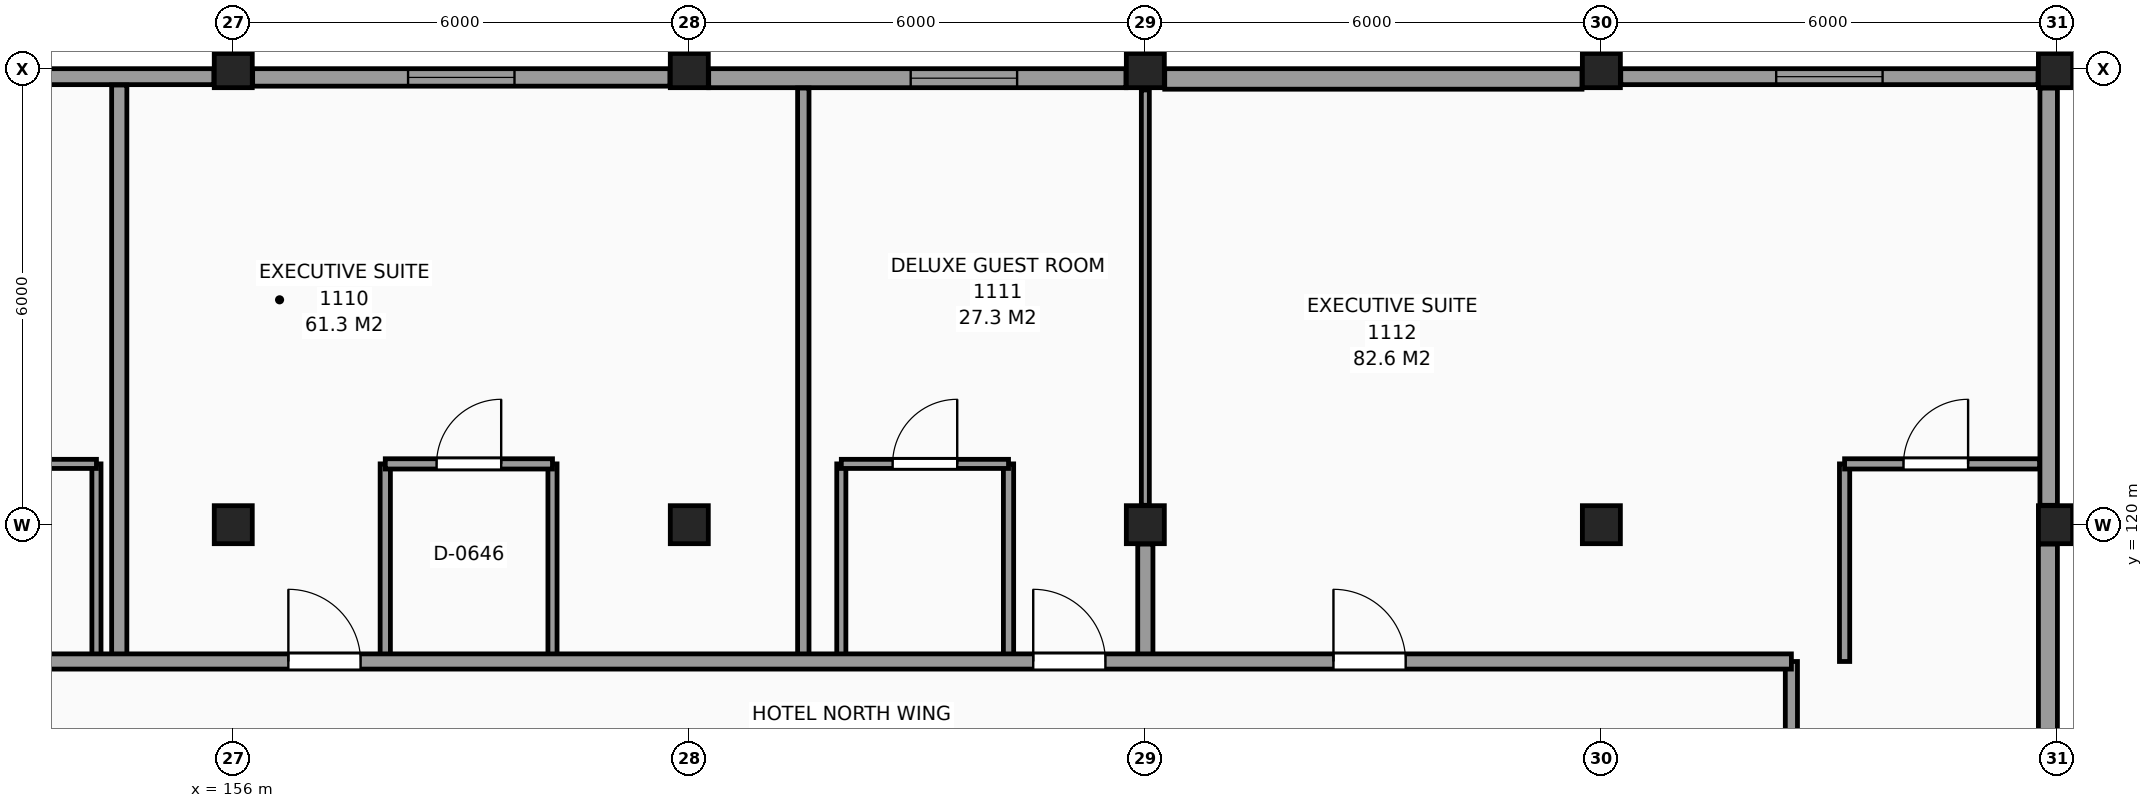
"""IFC4 building model, lengths in metres.
Left out: names, types, materials, properties, quantities, classifications, styles, units other than length and angle.
Written with IfcOpenShell. Run it as: python <this file> out.ifc"""

import sys

from ifc_helpers import new_model, si_unit, direction, frame, frame_2d, origin, origin_2d, place, context, subcontext, project, spatial, rectangle, extrude, element, fill, save


model = new_model("IFC4")
c1 = context("Model", 3, precision=1e-05, world=origin(), true_north=direction((0.0, 1.0)))
c2 = subcontext(c1, "Body", "Model", "MODEL_VIEW")
j1 = project(units=[si_unit("LENGTHUNIT", "METRE"), si_unit("PLANEANGLEUNIT", "RADIAN")], contexts=[c1])
p1 = place(None, origin())
s1 = spatial("IfcSite", under=j1, at=p1, CompositionType="ELEMENT")
p2 = place(p1, origin())
s2 = spatial("IfcBuilding", under=s1, at=p2, CompositionType="ELEMENT")
p3 = place(p2, frame((0.0, 0.0, 44.7)))
s3 = spatial("IfcBuildingStorey", under=s2, at=p3, CompositionType="ELEMENT", Elevation=44.7)
for number, where, z_axis, x_axis in (
    (1, (156.0, 120.0, 0.0), (0.0, 0.0, 1.0), (1.0, 0.0, 0.0)),
    (2, (156.0, 126.0, 0.0), (0.0, 0.0, 1.0), (1.0, 0.0, 0.0)),
    (3, (162.0, 120.0, 0.0), (0.0, 0.0, 1.0), (1.0, 0.0, 0.0)),
    (4, (162.0, 126.0, 0.0), (0.0, 0.0, 1.0), (1.0, 0.0, 0.0)),
    (5, (168.0, 120.0, 0.0), (0.0, 0.0, 1.0), (1.0, 0.0, 0.0)),
    (6, (168.0, 126.0, 0.0), (0.0, 0.0, 1.0), (1.0, 0.0, 0.0)),
    (7, (174.0, 120.0, 0.0), (0.0, 0.0, 1.0), (1.0, 0.0, 0.0)),
    (8, (174.0, 126.0, 0.0), (0.0, 0.0, 1.0), (1.0, 0.0, 0.0)),
    (9, (180.0, 120.0, 0.0), (0.0, 0.0, 1.0), (1.0, 0.0, 0.0)),
    (10, (180.0, 126.0, 0.0), (0.0, 0.0, 1.0), (1.0, 0.0, 0.0)),
):
    element("IfcColumn", number, at=place(p3, frame(where, z_axis=z_axis, x_axis=x_axis)), inside=s3, PredefinedType="COLUMN", context=c2, shape_type="SweptSolid", body=[
        extrude(rectangle(XDim=0.5, YDim=0.5, at=origin_2d()), origin(), (0.0, 0.0, 1.0), 3.3),
    ])
p4 = place(p3, frame((179.875, 114.255, 0.0), z_axis=(0.0, 0.0, 1.0), x_axis=(0.0, 1.0, 0.0)))
e11 = element("IfcWall", 11, at=p4, inside=s3, PredefinedType="SOLIDWALL", context=c2, shape_type="SweptSolid", body=[
    extrude(rectangle(XDim=5.49, YDim=0.25, at=frame_2d((2.745, 0.0))), origin(), (0.0, 0.0, 1.0), 2.4),
])
p5 = place(p3, frame((179.885, 120.255, 0.0), z_axis=(0.0, 0.0, 1.0), x_axis=(0.0, 1.0, 0.0)))
e12 = element("IfcWall", 12, at=p5, inside=s3, PredefinedType="SOLIDWALL", context=c2, shape_type="SweptSolid", body=[
    extrude(rectangle(XDim=5.49, YDim=0.23, at=frame_2d((2.745, 0.0))), origin(), (0.0, 0.0, 1.0), 2.4),
])
p6 = place(p3, frame((179.745, 125.895, 0.0), z_axis=(0.0, 0.0, 1.0), x_axis=(-1.0, 0.0, 0.0)))
e13 = element("IfcWall", 13, at=p6, inside=s3, PredefinedType="SOLIDWALL", context=c2, shape_type="SweptSolid", body=[
    extrude(rectangle(XDim=5.49, YDim=0.21, at=frame_2d((2.745, 0.0))), origin(), (0.0, 0.0, 1.0), 2.4),
])
p7 = place(p6, frame((2.045, 0.0, 0.8)))
e14 = element("IfcOpeningElement", 14, at=p7, cuts=e13, PredefinedType="OPENING", context=c2, shape_type="SweptSolid", body=[
    extrude(rectangle(XDim=1.4, YDim=1.4, at=frame_2d((0.7, 0.7))), frame((0.0, 0.115, 0.0), z_axis=(0.0, -1.0, 0.0), x_axis=(1.0, 0.0, 0.0)), (0.0, 0.0, 1.0), 0.23),
])
p8 = place(p3, frame((173.745, 125.865, 0.0), z_axis=(0.0, 0.0, 1.0), x_axis=(-1.0, 0.0, 0.0)))
e15 = element("IfcWall", 15, at=p8, inside=s3, PredefinedType="SOLIDWALL", context=c2, shape_type="SweptSolid", body=[
    extrude(rectangle(XDim=5.49, YDim=0.27, at=frame_2d((2.745, 0.0))), origin(), (0.0, 0.0, 1.0), 2.4),
])
p9 = place(p3, frame((167.745, 125.875, 0.0), z_axis=(0.0, 0.0, 1.0), x_axis=(-1.0, 0.0, 0.0)))
e16 = element("IfcWall", 16, at=p9, inside=s3, PredefinedType="SOLIDWALL", context=c2, shape_type="SweptSolid", body=[
    extrude(rectangle(XDim=5.49, YDim=0.25, at=frame_2d((2.745, 0.0))), origin(), (0.0, 0.0, 1.0), 2.4),
])
p10 = place(p9, frame((1.432, 0.0, 0.8)))
e17 = element("IfcOpeningElement", 17, at=p10, cuts=e16, PredefinedType="OPENING", context=c2, shape_type="SweptSolid", body=[
    extrude(rectangle(XDim=1.4, YDim=1.4, at=frame_2d((0.7, 0.7))), frame((0.0, 0.135, 0.0), z_axis=(0.0, -1.0, 0.0), x_axis=(1.0, 0.0, 0.0)), (0.0, 0.0, 1.0), 0.27),
])
p11 = place(p3, frame((161.745, 125.885, 0.0), z_axis=(0.0, 0.0, 1.0), x_axis=(-1.0, 0.0, 0.0)))
e18 = element("IfcWall", 18, at=p11, inside=s3, PredefinedType="SOLIDWALL", context=c2, shape_type="SweptSolid", body=[
    extrude(rectangle(XDim=5.49, YDim=0.23, at=frame_2d((2.745, 0.0))), origin(), (0.0, 0.0, 1.0), 2.4),
])
p12 = place(p11, frame((2.045, 0.0, 0.8)))
e19 = element("IfcOpeningElement", 19, at=p12, cuts=e18, PredefinedType="OPENING", context=c2, shape_type="SweptSolid", body=[
    extrude(rectangle(XDim=1.4, YDim=1.4, at=frame_2d((0.7, 0.7))), frame((0.0, 0.125, 0.0), z_axis=(0.0, -1.0, 0.0), x_axis=(1.0, 0.0, 0.0)), (0.0, 0.0, 1.0), 0.25),
])
p13 = place(p3, frame((155.745, 125.895, 0.0), z_axis=(0.0, 0.0, 1.0), x_axis=(-1.0, 0.0, 0.0)))
e20 = element("IfcWall", 20, at=p13, inside=s3, PredefinedType="SOLIDWALL", context=c2, shape_type="SweptSolid", body=[
    extrude(rectangle(XDim=5.49, YDim=0.21, at=frame_2d((2.745, 0.0))), origin(), (0.0, 0.0, 1.0), 2.4),
])
p14 = place(p13, frame((2.658, 0.0, 0.8)))
e21 = element("IfcOpeningElement", 21, at=p14, cuts=e20, PredefinedType="OPENING", context=c2, shape_type="SweptSolid", body=[
    extrude(rectangle(XDim=1.4, YDim=1.4, at=frame_2d((0.7, 0.7))), frame((0.0, 0.115, 0.0), z_axis=(0.0, -1.0, 0.0), x_axis=(1.0, 0.0, 0.0)), (0.0, 0.0, 1.0), 0.23),
])
p15 = place(p3, frame((154.2, 118.2, 0.0), z_axis=(0.0, 0.0, 1.0), x_axis=(0.0, 1.0, 0.0)))
e22 = element("IfcWall", 22, at=p15, inside=s3, PredefinedType="PARTITIONING", context=c2, shape_type="SweptSolid", body=[
    extrude(rectangle(XDim=2.6, YDim=0.12, at=frame_2d((1.3, 0.0))), origin(), (0.0, 0.0, 1.0), 3.05),
])
p16 = place(p3, frame((154.5, 118.2, 0.0), z_axis=(0.0, 0.0, 1.0), x_axis=(0.0, 1.0, 0.0)))
e23 = element("IfcWall", 23, at=p16, inside=s3, PredefinedType="PARTITIONING", context=c2, shape_type="SweptSolid", body=[
    extrude(rectangle(XDim=7.585, YDim=0.2, at=frame_2d((3.792, 0.0))), origin(), (0.0, 0.0, 1.0), 3.05),
])
p17 = place(p3, frame((158.0, 118.2, 0.0), z_axis=(0.0, 0.0, 1.0), x_axis=(0.0, 1.0, 0.0)))
e24 = element("IfcWall", 24, at=p17, inside=s3, PredefinedType="PARTITIONING", context=c2, shape_type="SweptSolid", body=[
    extrude(rectangle(XDim=2.6, YDim=0.135, at=frame_2d((1.3, 0.0))), origin(), (0.0, 0.0, 1.0), 3.05),
])
p18 = place(p3, frame((160.2, 118.2, 0.0), z_axis=(0.0, 0.0, 1.0), x_axis=(0.0, 1.0, 0.0)))
e25 = element("IfcWall", 25, at=p18, inside=s3, PredefinedType="PARTITIONING", context=c2, shape_type="SweptSolid", body=[
    extrude(rectangle(XDim=2.6, YDim=0.12, at=frame_2d((1.3, 0.0))), origin(), (0.0, 0.0, 1.0), 3.05),
])
p19 = place(p3, frame((163.5, 118.2, 0.0), z_axis=(0.0, 0.0, 1.0), x_axis=(0.0, 1.0, 0.0)))
e26 = element("IfcWall", 26, at=p19, inside=s3, PredefinedType="PARTITIONING", context=c2, shape_type="SweptSolid", body=[
    extrude(rectangle(XDim=7.545, YDim=0.15, at=frame_2d((3.772, 0.0))), origin(), (0.0, 0.0, 1.0), 3.05),
])
p20 = place(p3, frame((164.0, 118.2, 0.0), z_axis=(0.0, 0.0, 1.0), x_axis=(0.0, 1.0, 0.0)))
e27 = element("IfcWall", 27, at=p20, inside=s3, PredefinedType="PARTITIONING", context=c2, shape_type="SweptSolid", body=[
    extrude(rectangle(XDim=2.6, YDim=0.12, at=frame_2d((1.3, 0.0))), origin(), (0.0, 0.0, 1.0), 3.05),
])
p21 = place(p3, frame((166.2, 118.2, 0.0), z_axis=(0.0, 0.0, 1.0), x_axis=(0.0, 1.0, 0.0)))
e28 = element("IfcWall", 28, at=p21, inside=s3, PredefinedType="PARTITIONING", context=c2, shape_type="SweptSolid", body=[
    extrude(rectangle(XDim=2.6, YDim=0.135, at=frame_2d((1.3, 0.0))), origin(), (0.0, 0.0, 1.0), 3.05),
])
p22 = place(p3, frame((168.0, 118.2, 0.0), z_axis=(0.0, 0.0, 1.0), x_axis=(0.0, 1.0, 0.0)))
e29 = element("IfcWall", 29, at=p22, inside=s3, PredefinedType="PARTITIONING", context=c2, shape_type="SweptSolid", body=[
    extrude(rectangle(XDim=1.545, YDim=0.2, at=frame_2d((0.772, 0.0))), origin(), (0.0, 0.0, 1.0), 2.35),
])
p23 = place(p3, frame((168.0, 120.255, 0.0), z_axis=(0.0, 0.0, 1.0), x_axis=(0.0, 1.0, 0.0)))
e30 = element("IfcWall", 30, at=p23, inside=s3, PredefinedType="PARTITIONING", context=c2, shape_type="SweptSolid", body=[
    extrude(rectangle(XDim=5.465, YDim=0.105, at=frame_2d((2.732, 0.0))), origin(), (0.0, 0.0, 1.0), 2.5),
])
p24 = place(p3, frame((176.5, 115.8, 0.0), z_axis=(0.0, 0.0, 1.0), x_axis=(0.0, 1.0, 0.0)))
e31 = element("IfcWall", 31, at=p24, inside=s3, PredefinedType="PARTITIONING", context=c2, shape_type="SweptSolid", body=[
    extrude(rectangle(XDim=2.4, YDim=0.16, at=frame_2d((1.2, 0.0))), origin(), (0.0, 0.0, 1.0), 3.05),
])
p25 = place(p3, frame((177.2, 118.2, 0.0), z_axis=(0.0, 0.0, 1.0), x_axis=(0.0, 1.0, 0.0)))
e32 = element("IfcWall", 32, at=p25, inside=s3, PredefinedType="PARTITIONING", context=c2, shape_type="SweptSolid", body=[
    extrude(rectangle(XDim=2.6, YDim=0.135, at=frame_2d((1.3, 0.0))), origin(), (0.0, 0.0, 1.0), 3.05),
])
p26 = place(p3, frame((102.255, 118.2, 0.0), z_axis=(0.0, 0.0, 1.0), x_axis=(1.0, 0.0, 0.0)))
e33 = element("IfcWall", 33, at=p26, inside=s3, PredefinedType="PARTITIONING", context=c2, shape_type="SweptSolid", body=[
    extrude(rectangle(XDim=74.245, YDim=0.2, at=frame_2d((37.123, 0.0))), origin(), (0.0, 0.0, 1.0), 3.05),
])
p27 = place(p26, frame((0.47, 0.0, 0.0)))
e34 = element("IfcOpeningElement", 34, at=p27, cuts=e33, PredefinedType="OPENING", context=c2, shape_type="SweptSolid", body=[
    extrude(rectangle(XDim=0.95, YDim=2.1, at=frame_2d((0.475, 1.05))), frame((0.0, 0.11, 0.0), z_axis=(0.0, -1.0, 0.0), x_axis=(1.0, 0.0, 0.0)), (0.0, 0.0, 1.0), 0.22),
])
p28 = place(p26, frame((4.87, 0.0, 0.0)))
e35 = element("IfcOpeningElement", 35, at=p28, cuts=e33, PredefinedType="OPENING", context=c2, shape_type="SweptSolid", body=[
    extrude(rectangle(XDim=0.95, YDim=2.1, at=frame_2d((0.475, 1.05))), frame((0.0, 0.11, 0.0), z_axis=(0.0, -1.0, 0.0), x_axis=(1.0, 0.0, 0.0)), (0.0, 0.0, 1.0), 0.22),
])
p29 = place(p26, frame((12.07, 0.0, 0.0)))
e36 = element("IfcOpeningElement", 36, at=p29, cuts=e33, PredefinedType="OPENING", context=c2, shape_type="SweptSolid", body=[
    extrude(rectangle(XDim=0.95, YDim=2.1, at=frame_2d((0.475, 1.05))), frame((0.0, 0.11, 0.0), z_axis=(0.0, -1.0, 0.0), x_axis=(1.0, 0.0, 0.0)), (0.0, 0.0, 1.0), 0.22),
])
p30 = place(p26, frame((16.27, 0.0, 0.0)))
e37 = element("IfcOpeningElement", 37, at=p30, cuts=e33, PredefinedType="OPENING", context=c2, shape_type="SweptSolid", body=[
    extrude(rectangle(XDim=0.95, YDim=2.1, at=frame_2d((0.475, 1.05))), frame((0.0, 0.11, 0.0), z_axis=(0.0, -1.0, 0.0), x_axis=(1.0, 0.0, 0.0)), (0.0, 0.0, 1.0), 0.22),
])
p31 = place(p26, frame((25.57, 0.0, 0.0)))
e38 = element("IfcOpeningElement", 38, at=p31, cuts=e33, PredefinedType="OPENING", context=c2, shape_type="SweptSolid", body=[
    extrude(rectangle(XDim=0.95, YDim=2.1, at=frame_2d((0.475, 1.05))), frame((0.0, 0.11, 0.0), z_axis=(0.0, -1.0, 0.0), x_axis=(1.0, 0.0, 0.0)), (0.0, 0.0, 1.0), 0.22),
])
p32 = place(p26, frame((30.07, 0.0, 0.0)))
e39 = element("IfcOpeningElement", 39, at=p32, cuts=e33, PredefinedType="OPENING", context=c2, shape_type="SweptSolid", body=[
    extrude(rectangle(XDim=0.95, YDim=2.1, at=frame_2d((0.475, 1.05))), frame((0.0, 0.11, 0.0), z_axis=(0.0, -1.0, 0.0), x_axis=(1.0, 0.0, 0.0)), (0.0, 0.0, 1.0), 0.22),
])
p33 = place(p26, frame((38.32, 0.0, 0.0)))
e40 = element("IfcOpeningElement", 40, at=p33, cuts=e33, PredefinedType="OPENING", context=c2, shape_type="SweptSolid", body=[
    extrude(rectangle(XDim=0.95, YDim=2.1, at=frame_2d((0.475, 1.05))), frame((0.0, 0.11, 0.0), z_axis=(0.0, -1.0, 0.0), x_axis=(1.0, 0.0, 0.0)), (0.0, 0.0, 1.0), 0.22),
])
p34 = place(p26, frame((46.27, 0.0, 0.0)))
e41 = element("IfcOpeningElement", 41, at=p34, cuts=e33, PredefinedType="OPENING", context=c2, shape_type="SweptSolid", body=[
    extrude(rectangle(XDim=0.95, YDim=2.1, at=frame_2d((0.475, 1.05))), frame((0.0, 0.11, 0.0), z_axis=(0.0, -1.0, 0.0), x_axis=(1.0, 0.0, 0.0)), (0.0, 0.0, 1.0), 0.22),
])
p35 = place(p26, frame((48.47, 0.0, 0.0)))
e42 = element("IfcOpeningElement", 42, at=p35, cuts=e33, PredefinedType="OPENING", context=c2, shape_type="SweptSolid", body=[
    extrude(rectangle(XDim=0.95, YDim=2.1, at=frame_2d((0.475, 1.05))), frame((0.0, 0.11, 0.0), z_axis=(0.0, -1.0, 0.0), x_axis=(1.0, 0.0, 0.0)), (0.0, 0.0, 1.0), 0.22),
])
p36 = place(p26, frame((54.47, 0.0, 0.0)))
e43 = element("IfcOpeningElement", 43, at=p36, cuts=e33, PredefinedType="OPENING", context=c2, shape_type="SweptSolid", body=[
    extrude(rectangle(XDim=0.95, YDim=2.1, at=frame_2d((0.475, 1.05))), frame((0.0, 0.11, 0.0), z_axis=(0.0, -1.0, 0.0), x_axis=(1.0, 0.0, 0.0)), (0.0, 0.0, 1.0), 0.22),
])
p37 = place(p26, frame((64.27, 0.0, 0.0)))
e44 = element("IfcOpeningElement", 44, at=p37, cuts=e33, PredefinedType="OPENING", context=c2, shape_type="SweptSolid", body=[
    extrude(rectangle(XDim=0.95, YDim=2.1, at=frame_2d((0.475, 1.05))), frame((0.0, 0.11, 0.0), z_axis=(0.0, -1.0, 0.0), x_axis=(1.0, 0.0, 0.0)), (0.0, 0.0, 1.0), 0.22),
])
p38 = place(p26, frame((68.22, 0.0, 0.0)))
e45 = element("IfcOpeningElement", 45, at=p38, cuts=e33, PredefinedType="OPENING", context=c2, shape_type="SweptSolid", body=[
    extrude(rectangle(XDim=0.95, YDim=2.1, at=frame_2d((0.475, 1.05))), frame((0.0, 0.11, 0.0), z_axis=(0.0, -1.0, 0.0), x_axis=(1.0, 0.0, 0.0)), (0.0, 0.0, 1.0), 0.22),
])
p39 = place(p3, frame((152.0, 120.8, 0.0), z_axis=(0.0, 0.0, 1.0), x_axis=(1.0, 0.0, 0.0)))
e46 = element("IfcWall", 46, at=p39, inside=s3, PredefinedType="PARTITIONING", context=c2, shape_type="SweptSolid", body=[
    extrude(rectangle(XDim=2.2, YDim=0.12, at=frame_2d((1.1, 0.0))), origin(), (0.0, 0.0, 1.0), 3.05),
])
p40 = place(p39, frame((0.675, 0.0, 0.0)))
e47 = element("IfcOpeningElement", 47, at=p40, cuts=e46, PredefinedType="OPENING", context=c2, shape_type="SweptSolid", body=[
    extrude(rectangle(XDim=0.85, YDim=2.1, at=frame_2d((0.425, 1.05))), frame((0.0, 0.07, 0.0), z_axis=(0.0, -1.0, 0.0), x_axis=(1.0, 0.0, 0.0)), (0.0, 0.0, 1.0), 0.14),
])
p41 = place(p3, frame((158.0, 120.8, 0.0), z_axis=(0.0, 0.0, 1.0), x_axis=(1.0, 0.0, 0.0)))
e48 = element("IfcWall", 48, at=p41, inside=s3, PredefinedType="PARTITIONING", context=c2, shape_type="SweptSolid", body=[
    extrude(rectangle(XDim=2.2, YDim=0.135, at=frame_2d((1.1, 0.0))), origin(), (0.0, 0.0, 1.0), 3.05),
])
p42 = place(p41, frame((0.675, 0.0, 0.0)))
e49 = element("IfcOpeningElement", 49, at=p42, cuts=e48, PredefinedType="OPENING", context=c2, shape_type="SweptSolid", body=[
    extrude(rectangle(XDim=0.85, YDim=2.1, at=frame_2d((0.425, 1.05))), frame((0.0, 0.078, 0.0), z_axis=(0.0, -1.0, 0.0), x_axis=(1.0, 0.0, 0.0)), (0.0, 0.0, 1.0), 0.155),
])
p43 = place(p3, frame((164.0, 120.8, 0.0), z_axis=(0.0, 0.0, 1.0), x_axis=(1.0, 0.0, 0.0)))
e50 = element("IfcWall", 50, at=p43, inside=s3, PredefinedType="PARTITIONING", context=c2, shape_type="SweptSolid", body=[
    extrude(rectangle(XDim=2.2, YDim=0.12, at=frame_2d((1.1, 0.0))), origin(), (0.0, 0.0, 1.0), 3.05),
])
p44 = place(p43, frame((0.675, 0.0, 0.0)))
e51 = element("IfcOpeningElement", 51, at=p44, cuts=e50, PredefinedType="OPENING", context=c2, shape_type="SweptSolid", body=[
    extrude(rectangle(XDim=0.85, YDim=2.1, at=frame_2d((0.425, 1.05))), frame((0.0, 0.07, 0.0), z_axis=(0.0, -1.0, 0.0), x_axis=(1.0, 0.0, 0.0)), (0.0, 0.0, 1.0), 0.14),
])
p45 = place(p3, frame((177.2, 120.8, 0.0), z_axis=(0.0, 0.0, 1.0), x_axis=(1.0, 0.0, 0.0)))
e52 = element("IfcWall", 52, at=p45, inside=s3, PredefinedType="PARTITIONING", context=c2, shape_type="SweptSolid", body=[
    extrude(rectangle(XDim=2.565, YDim=0.135, at=frame_2d((1.282, 0.0))), origin(), (0.0, 0.0, 1.0), 3.05),
])
p46 = place(p45, frame((0.775, 0.0, 0.0)))
e53 = element("IfcOpeningElement", 53, at=p46, cuts=e52, PredefinedType="OPENING", context=c2, shape_type="SweptSolid", body=[
    extrude(rectangle(XDim=0.85, YDim=2.1, at=frame_2d((0.425, 1.05))), frame((0.0, 0.078, 0.0), z_axis=(0.0, -1.0, 0.0), x_axis=(1.0, 0.0, 0.0)), (0.0, 0.0, 1.0), 0.155),
])
p47 = place(p12, origin())
e54 = element("IfcWindow", 54, at=p47, inside=s3, PartitioningType="SINGLE_PANEL", PredefinedType="WINDOW", context=c2, shape_type="SweptSolid", body=[
    extrude(rectangle(XDim=1.4, YDim=1.4, at=frame_2d((0.7, 0.7))), frame((0.0, 0.03, 0.0), z_axis=(0.0, -1.0, 0.0), x_axis=(1.0, 0.0, 0.0)), (0.0, 0.0, 1.0), 0.06),
])
fill(e19, e54)
p48 = place(p10, origin())
e55 = element("IfcWindow", 55, at=p48, inside=s3, PartitioningType="SINGLE_PANEL", PredefinedType="WINDOW", context=c2, shape_type="SweptSolid", body=[
    extrude(rectangle(XDim=1.4, YDim=1.4, at=frame_2d((0.7, 0.7))), frame((0.0, 0.03, 0.0), z_axis=(0.0, -1.0, 0.0), x_axis=(1.0, 0.0, 0.0)), (0.0, 0.0, 1.0), 0.06),
])
fill(e17, e55)
p49 = place(p7, origin())
e56 = element("IfcWindow", 56, at=p49, inside=s3, PartitioningType="SINGLE_PANEL", PredefinedType="WINDOW", context=c2, shape_type="SweptSolid", body=[
    extrude(rectangle(XDim=1.4, YDim=1.4, at=frame_2d((0.7, 0.7))), frame((0.0, 0.03, 0.0), z_axis=(0.0, -1.0, 0.0), x_axis=(1.0, 0.0, 0.0)), (0.0, 0.0, 1.0), 0.06),
])
fill(e14, e56)
p50 = place(p42, origin())
e57 = element("IfcDoor", 57, at=p50, inside=s3, OperationType="SINGLE_SWING_RIGHT", PredefinedType="DOOR", context=c2, shape_type="SweptSolid", body=[
    extrude(rectangle(XDim=0.85, YDim=2.1, at=frame_2d((0.425, 1.05))), frame((0.0, 0.025, 0.0), z_axis=(0.0, -1.0, 0.0), x_axis=(1.0, 0.0, 0.0)), (0.0, 0.0, 1.0), 0.05),
])
fill(e49, e57)
p51 = place(p36, origin())
e58 = element("IfcDoor", 58, at=p51, inside=s3, OperationType="SINGLE_SWING_LEFT", PredefinedType="DOOR", context=c2, shape_type="SweptSolid", body=[
    extrude(rectangle(XDim=0.95, YDim=2.1, at=frame_2d((0.475, 1.05))), frame((0.0, 0.025, 0.0), z_axis=(0.0, -1.0, 0.0), x_axis=(1.0, 0.0, 0.0)), (0.0, 0.0, 1.0), 0.05),
])
fill(e43, e58)
p52 = place(p44, origin())
e59 = element("IfcDoor", 59, at=p52, inside=s3, OperationType="SINGLE_SWING_RIGHT", PredefinedType="DOOR", context=c2, shape_type="SweptSolid", body=[
    extrude(rectangle(XDim=0.85, YDim=2.1, at=frame_2d((0.425, 1.05))), frame((0.0, 0.025, 0.0), z_axis=(0.0, -1.0, 0.0), x_axis=(1.0, 0.0, 0.0)), (0.0, 0.0, 1.0), 0.05),
])
fill(e51, e59)
p53 = place(p37, origin())
e60 = element("IfcDoor", 60, at=p53, inside=s3, OperationType="SINGLE_SWING_LEFT", PredefinedType="DOOR", context=c2, shape_type="SweptSolid", body=[
    extrude(rectangle(XDim=0.95, YDim=2.1, at=frame_2d((0.475, 1.05))), frame((0.0, 0.025, 0.0), z_axis=(0.0, -1.0, 0.0), x_axis=(1.0, 0.0, 0.0)), (0.0, 0.0, 1.0), 0.05),
])
fill(e44, e60)
p54 = place(p46, origin())
e61 = element("IfcDoor", 61, at=p54, inside=s3, OperationType="SINGLE_SWING_RIGHT", PredefinedType="DOOR", context=c2, shape_type="SweptSolid", body=[
    extrude(rectangle(XDim=0.85, YDim=2.1, at=frame_2d((0.425, 1.05))), frame((0.0, 0.025, 0.0), z_axis=(0.0, -1.0, 0.0), x_axis=(1.0, 0.0, 0.0)), (0.0, 0.0, 1.0), 0.05),
])
fill(e53, e61)
p55 = place(p38, origin())
e62 = element("IfcDoor", 62, at=p55, inside=s3, OperationType="SINGLE_SWING_LEFT", PredefinedType="DOOR", context=c2, shape_type="SweptSolid", body=[
    extrude(rectangle(XDim=0.95, YDim=2.1, at=frame_2d((0.475, 1.05))), frame((0.0, 0.025, 0.0), z_axis=(0.0, -1.0, 0.0), x_axis=(1.0, 0.0, 0.0)), (0.0, 0.0, 1.0), 0.05),
])
fill(e45, e62)
save(model, sys.argv[1])
